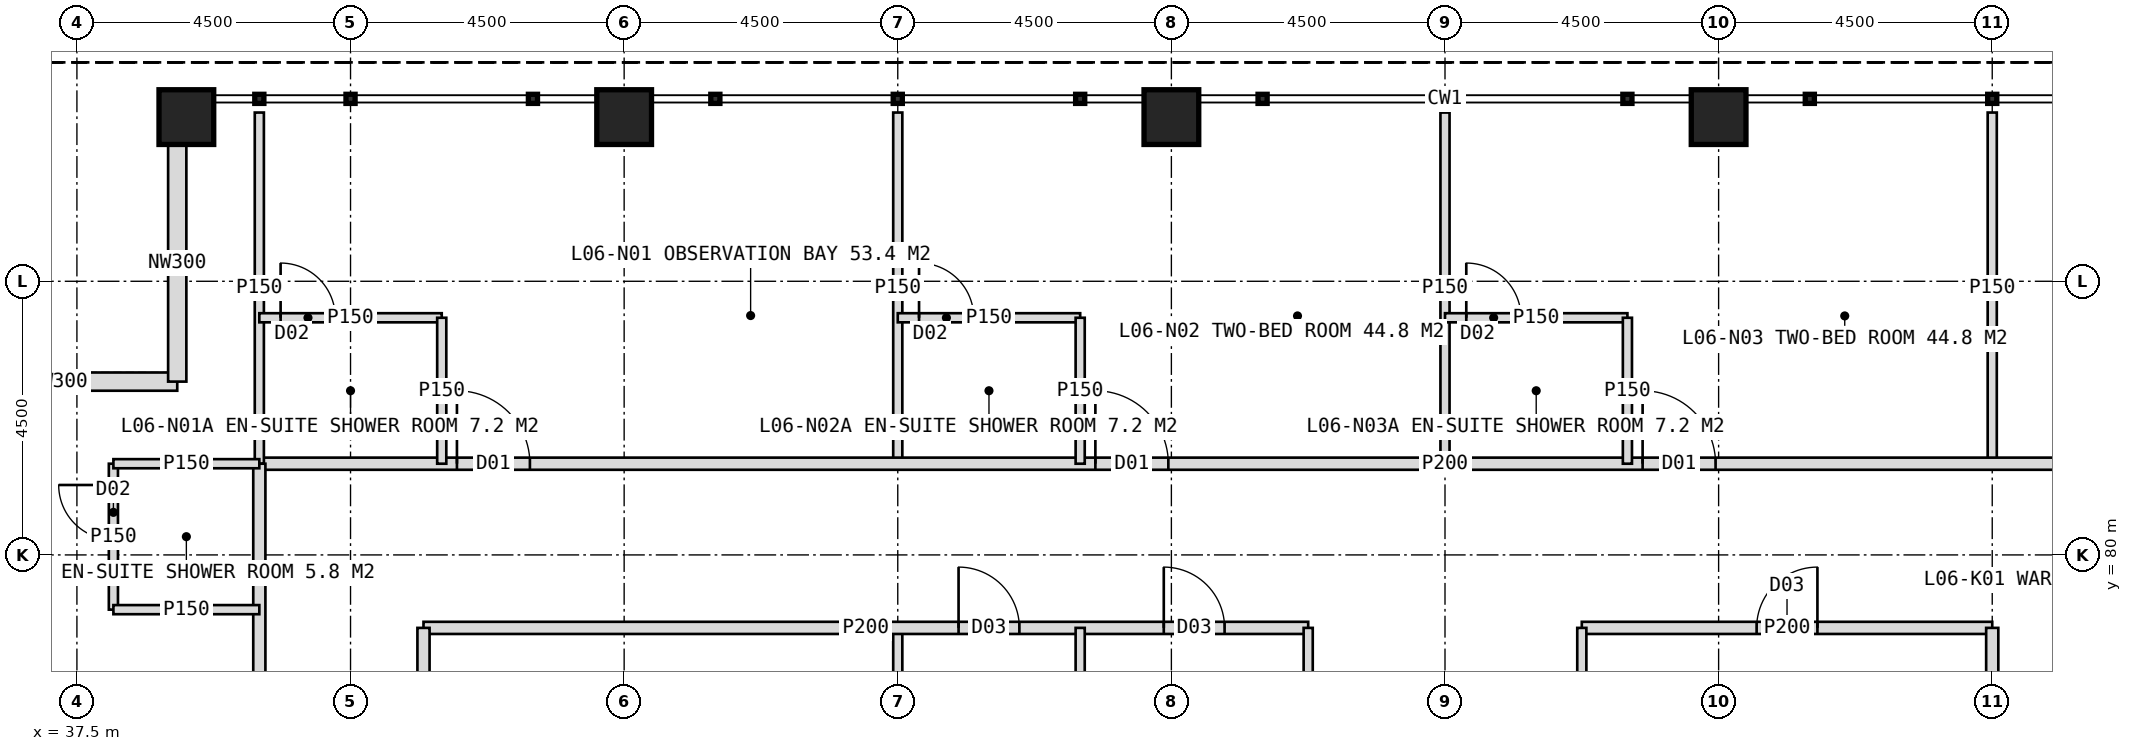
"""IFC4 building model, lengths in metres.
Left out: names, types, materials, properties, quantities, classifications, styles, units other than length and angle.
Written with IfcOpenShell. Run it as: python <this file> out.ifc"""

import sys

from ifc_helpers import new_model, si_unit, direction, frame, frame_2d, origin, origin_2d, place, context, subcontext, project, spatial, rectangle, hollow_rectangle, extrude, element, fill, save


model = new_model("IFC4")
c1 = context("Model", 3, precision=1e-05, world=origin(), true_north=direction((0.0, 1.0)))
c2 = subcontext(c1, "Body", "Model", "MODEL_VIEW")
j1 = project(units=[si_unit("LENGTHUNIT", "METRE"), si_unit("PLANEANGLEUNIT", "RADIAN")], contexts=[c1])
p1 = place(None, origin())
s1 = spatial("IfcSite", under=j1, at=p1, CompositionType="ELEMENT")
p2 = place(p1, origin())
s2 = spatial("IfcBuilding", under=s1, at=p2, CompositionType="ELEMENT")
p3 = place(p2, frame((0.0, 0.0, 31.0)))
s3 = spatial("IfcBuildingStorey", under=s2, at=p3, CompositionType="ELEMENT", Elevation=31.0)
for number, where, z_axis, x_axis in (
    (1, (39.3, 87.2, 0.0), (0.0, 0.0, 1.0), (1.0, 0.0, 0.0)),
    (2, (46.5, 87.2, 0.0), (0.0, 0.0, 1.0), (1.0, 0.0, 0.0)),
    (3, (55.5, 87.2, 0.0), (0.0, 0.0, 1.0), (1.0, 0.0, 0.0)),
    (4, (64.5, 87.2, 0.0), (0.0, 0.0, 1.0), (1.0, 0.0, 0.0)),
):
    element("IfcColumn", number, at=place(p3, frame(where, z_axis=z_axis, x_axis=x_axis)), inside=s3, PredefinedType="COLUMN", context=c2, shape_type="SweptSolid", body=[
        extrude(hollow_rectangle(XDim=0.9, YDim=0.9, WallThickness=0.08, at=origin_2d()), origin(), (0.0, 0.0, 1.0), 4.0),
    ])
for number, where, z_axis, x_axis in (
    (5, (35.25, 82.85, 0.0), (0.0, 0.0, 1.0), (1.0, 0.0, 0.0)),
    (6, (39.15, 82.85, 0.0), (0.0, 0.0, 1.0), (0.0, 1.0, 0.0)),
):
    element("IfcWall", number, at=place(p3, frame(where, z_axis=z_axis, x_axis=x_axis)), inside=s3, PredefinedType="ELEMENTEDWALL", context=c2, shape_type="SweptSolid", body=[
        extrude(rectangle(XDim=3.9, YDim=0.3, at=frame_2d((1.95, 0.0))), origin(), (0.0, 0.0, 1.0), 2.95),
    ])
p4 = place(p3, frame((51.0, 81.5, 0.0), z_axis=(0.0, 0.0, 1.0), x_axis=(0.0, 1.0, 0.0)))
e7 = element("IfcWall", 7, at=p4, inside=s3, PredefinedType="PARTITIONING", context=c2, shape_type="SweptSolid", body=[
    extrude(rectangle(XDim=5.775, YDim=0.15, at=frame_2d((2.887, 0.0))), origin(), (0.0, 0.0, 1.0), 3.75),
])
p5 = place(p3, frame((60.0, 81.5, 0.0), z_axis=(0.0, 0.0, 1.0), x_axis=(0.0, 1.0, 0.0)))
e8 = element("IfcWall", 8, at=p5, inside=s3, PredefinedType="PARTITIONING", context=c2, shape_type="SweptSolid", body=[
    extrude(rectangle(XDim=5.775, YDim=0.15, at=frame_2d((2.887, 0.0))), origin(), (0.0, 0.0, 1.0), 2.75),
])
p6 = place(p3, frame((69.0, 81.5, 0.0), z_axis=(0.0, 0.0, 1.0), x_axis=(0.0, 1.0, 0.0)))
e9 = element("IfcWall", 9, at=p6, inside=s3, PredefinedType="PARTITIONING", context=c2, shape_type="SweptSolid", body=[
    extrude(rectangle(XDim=5.775, YDim=0.15, at=frame_2d((2.887, 0.0))), origin(), (0.0, 0.0, 1.0), 3.75),
])
p7 = place(p3, frame((40.5, 81.5, 0.0), z_axis=(0.0, 0.0, 1.0), x_axis=(1.0, 0.0, 0.0)))
e10 = element("IfcWall", 10, at=p7, inside=s3, PredefinedType="PARTITIONING", context=c2, shape_type="SweptSolid", body=[
    extrude(rectangle(XDim=39.0, YDim=0.2, at=frame_2d((19.5, 0.0))), origin(), (0.0, 0.0, 1.0), 3.75),
])
p8 = place(p7, frame((3.25, 0.0, 0.0)))
e11 = element("IfcOpeningElement", 11, at=p8, cuts=e10, PredefinedType="OPENING", context=c2, shape_type="SweptSolid", body=[
    extrude(rectangle(XDim=1.2, YDim=2.2, at=frame_2d((0.6, 1.1))), frame((0.0, 0.11, 0.0), z_axis=(0.0, -1.0, 0.0), x_axis=(1.0, 0.0, 0.0)), (0.0, 0.0, 1.0), 0.22),
])
p9 = place(p7, frame((13.75, 0.0, 0.0)))
e12 = element("IfcOpeningElement", 12, at=p9, cuts=e10, PredefinedType="OPENING", context=c2, shape_type="SweptSolid", body=[
    extrude(rectangle(XDim=1.2, YDim=2.2, at=frame_2d((0.6, 1.1))), frame((0.0, 0.11, 0.0), z_axis=(0.0, -1.0, 0.0), x_axis=(1.0, 0.0, 0.0)), (0.0, 0.0, 1.0), 0.22),
])
p10 = place(p7, frame((22.75, 0.0, 0.0)))
e13 = element("IfcOpeningElement", 13, at=p10, cuts=e10, PredefinedType="OPENING", context=c2, shape_type="SweptSolid", body=[
    extrude(rectangle(XDim=1.2, YDim=2.2, at=frame_2d((0.6, 1.1))), frame((0.0, 0.11, 0.0), z_axis=(0.0, -1.0, 0.0), x_axis=(1.0, 0.0, 0.0)), (0.0, 0.0, 1.0), 0.22),
])
p11 = place(p7, frame((33.25, 0.0, 0.0)))
e14 = element("IfcOpeningElement", 14, at=p11, cuts=e10, PredefinedType="OPENING", context=c2, shape_type="SweptSolid", body=[
    extrude(rectangle(XDim=1.0, YDim=2.1, at=frame_2d((0.5, 1.05))), frame((0.0, 0.11, 0.0), z_axis=(0.0, -1.0, 0.0), x_axis=(1.0, 0.0, 0.0)), (0.0, 0.0, 1.0), 0.22),
])
p12 = place(p3, frame((40.5, 81.5, 0.0), z_axis=(0.0, 0.0, 1.0), x_axis=(0.0, 1.0, 0.0)))
e15 = element("IfcWall", 15, at=p12, inside=s3, PredefinedType="PARTITIONING", context=c2, shape_type="SweptSolid", body=[
    extrude(rectangle(XDim=5.775, YDim=0.15, at=frame_2d((2.887, 0.0))), origin(), (0.0, 0.0, 1.0), 3.75),
])
p13 = place(p3, frame((40.5, 83.9, 0.0), z_axis=(0.0, 0.0, 1.0), x_axis=(1.0, 0.0, 0.0)))
e16 = element("IfcWall", 16, at=p13, inside=s3, PredefinedType="PARTITIONING", context=c2, shape_type="SweptSolid", body=[
    extrude(rectangle(XDim=3.0, YDim=0.15, at=frame_2d((1.5, 0.0))), origin(), (0.0, 0.0, 1.0), 3.75),
])
p14 = place(p13, frame((0.35, 0.0, 0.0)))
e17 = element("IfcOpeningElement", 17, at=p14, cuts=e16, PredefinedType="OPENING", context=c2, shape_type="SweptSolid", body=[
    extrude(rectangle(XDim=0.9, YDim=2.1, at=frame_2d((0.45, 1.05))), frame((0.0, 0.085, 0.0), z_axis=(0.0, -1.0, 0.0), x_axis=(1.0, 0.0, 0.0)), (0.0, 0.0, 1.0), 0.17),
])
p15 = place(p3, frame((43.5, 81.5, 0.0), z_axis=(0.0, 0.0, 1.0), x_axis=(0.0, 1.0, 0.0)))
e18 = element("IfcWall", 18, at=p15, inside=s3, PredefinedType="PARTITIONING", context=c2, shape_type="SweptSolid", body=[
    extrude(rectangle(XDim=2.4, YDim=0.15, at=frame_2d((1.2, 0.0))), origin(), (0.0, 0.0, 1.0), 3.75),
])
p16 = place(p3, frame((51.0, 83.9, 0.0), z_axis=(0.0, 0.0, 1.0), x_axis=(1.0, 0.0, 0.0)))
e19 = element("IfcWall", 19, at=p16, inside=s3, PredefinedType="PARTITIONING", context=c2, shape_type="SweptSolid", body=[
    extrude(rectangle(XDim=3.0, YDim=0.15, at=frame_2d((1.5, 0.0))), origin(), (0.0, 0.0, 1.0), 3.75),
])
p17 = place(p16, frame((0.35, 0.0, 0.0)))
e20 = element("IfcOpeningElement", 20, at=p17, cuts=e19, PredefinedType="OPENING", context=c2, shape_type="SweptSolid", body=[
    extrude(rectangle(XDim=0.9, YDim=2.1, at=frame_2d((0.45, 1.05))), frame((0.0, 0.085, 0.0), z_axis=(0.0, -1.0, 0.0), x_axis=(1.0, 0.0, 0.0)), (0.0, 0.0, 1.0), 0.17),
])
p18 = place(p3, frame((54.0, 81.5, 0.0), z_axis=(0.0, 0.0, 1.0), x_axis=(0.0, 1.0, 0.0)))
e21 = element("IfcWall", 21, at=p18, inside=s3, PredefinedType="PARTITIONING", context=c2, shape_type="SweptSolid", body=[
    extrude(rectangle(XDim=2.4, YDim=0.15, at=frame_2d((1.2, 0.0))), origin(), (0.0, 0.0, 1.0), 3.75),
])
p19 = place(p3, frame((60.0, 83.9, 0.0), z_axis=(0.0, 0.0, 1.0), x_axis=(1.0, 0.0, 0.0)))
e22 = element("IfcWall", 22, at=p19, inside=s3, PredefinedType="PARTITIONING", context=c2, shape_type="SweptSolid", body=[
    extrude(rectangle(XDim=3.0, YDim=0.15, at=frame_2d((1.5, 0.0))), origin(), (0.0, 0.0, 1.0), 3.75),
])
p20 = place(p19, frame((0.35, 0.0, 0.0)))
e23 = element("IfcOpeningElement", 23, at=p20, cuts=e22, PredefinedType="OPENING", context=c2, shape_type="SweptSolid", body=[
    extrude(rectangle(XDim=0.9, YDim=2.1, at=frame_2d((0.45, 1.05))), frame((0.0, 0.085, 0.0), z_axis=(0.0, -1.0, 0.0), x_axis=(1.0, 0.0, 0.0)), (0.0, 0.0, 1.0), 0.17),
])
p21 = place(p3, frame((63.0, 81.5, 0.0), z_axis=(0.0, 0.0, 1.0), x_axis=(0.0, 1.0, 0.0)))
e24 = element("IfcWall", 24, at=p21, inside=s3, PredefinedType="PARTITIONING", context=c2, shape_type="SweptSolid", body=[
    extrude(rectangle(XDim=2.4, YDim=0.15, at=frame_2d((1.2, 0.0))), origin(), (0.0, 0.0, 1.0), 3.75),
])
p22 = place(p3, frame((51.0, 71.0, 0.0), z_axis=(0.0, 0.0, 1.0), x_axis=(0.0, 1.0, 0.0)))
e25 = element("IfcWall", 25, at=p22, inside=s3, PredefinedType="PARTITIONING", context=c2, shape_type="SweptSolid", body=[
    extrude(rectangle(XDim=7.8, YDim=0.15, at=frame_2d((3.9, 0.0))), origin(), (0.0, 0.0, 1.0), 3.75),
])
p23 = place(p3, frame((43.2, 78.8, 0.0), z_axis=(0.0, 0.0, 1.0), x_axis=(1.0, 0.0, 0.0)))
e26 = element("IfcWall", 26, at=p23, inside=s3, PredefinedType="PARTITIONING", context=c2, shape_type="SweptSolid", body=[
    extrude(rectangle(XDim=14.55, YDim=0.2, at=frame_2d((7.275, 0.0))), origin(), (0.0, 0.0, 1.0), 3.75),
])
p24 = place(p23, frame((8.8, 0.0, 0.0)))
e27 = element("IfcOpeningElement", 27, at=p24, cuts=e26, PredefinedType="OPENING", context=c2, shape_type="SweptSolid", body=[
    extrude(rectangle(XDim=1.0, YDim=2.1, at=frame_2d((0.5, 1.05))), frame((0.0, 0.11, 0.0), z_axis=(0.0, -1.0, 0.0), x_axis=(1.0, 0.0, 0.0)), (0.0, 0.0, 1.0), 0.22),
])
p25 = place(p23, frame((12.175, 0.0, 0.0)))
e28 = element("IfcOpeningElement", 28, at=p25, cuts=e26, PredefinedType="OPENING", context=c2, shape_type="SweptSolid", body=[
    extrude(rectangle(XDim=1.0, YDim=2.1, at=frame_2d((0.5, 1.05))), frame((0.0, 0.11, 0.0), z_axis=(0.0, -1.0, 0.0), x_axis=(1.0, 0.0, 0.0)), (0.0, 0.0, 1.0), 0.22),
])
p26 = place(p3, frame((62.25, 78.8, 0.0), z_axis=(0.0, 0.0, 1.0), x_axis=(1.0, 0.0, 0.0)))
e29 = element("IfcWall", 29, at=p26, inside=s3, PredefinedType="PARTITIONING", context=c2, shape_type="SweptSolid", body=[
    extrude(rectangle(XDim=6.75, YDim=0.2, at=frame_2d((3.375, 0.0))), origin(), (0.0, 0.0, 1.0), 3.75),
])
p27 = place(p26, frame((2.875, 0.0, 0.0)))
e30 = element("IfcOpeningElement", 30, at=p27, cuts=e29, PredefinedType="OPENING", context=c2, shape_type="SweptSolid", body=[
    extrude(rectangle(XDim=1.0, YDim=2.1, at=frame_2d((0.5, 1.05))), frame((0.0, 0.11, 0.0), z_axis=(0.0, -1.0, 0.0), x_axis=(1.0, 0.0, 0.0)), (0.0, 0.0, 1.0), 0.22),
])
p28 = place(p3, frame((57.75, 71.0, 0.0), z_axis=(0.0, 0.0, 1.0), x_axis=(0.0, 1.0, 0.0)))
e31 = element("IfcWall", 31, at=p28, inside=s3, PredefinedType="PARTITIONING", context=c2, shape_type="SweptSolid", body=[
    extrude(rectangle(XDim=7.8, YDim=0.15, at=frame_2d((3.9, 0.0))), origin(), (0.0, 0.0, 1.0), 3.75),
])
p29 = place(p28, frame((0.6, 0.0, 0.0)))
e32 = element("IfcOpeningElement", 32, at=p29, cuts=e31, PredefinedType="OPENING", context=c2, shape_type="SweptSolid", body=[
    extrude(rectangle(XDim=0.9, YDim=2.1, at=frame_2d((0.45, 1.05))), frame((0.0, 0.085, 0.0), z_axis=(0.0, -1.0, 0.0), x_axis=(1.0, 0.0, 0.0)), (0.0, 0.0, 1.0), 0.17),
])
p30 = place(p3, frame((62.25, 71.0, 0.0), z_axis=(0.0, 0.0, 1.0), x_axis=(0.0, 1.0, 0.0)))
e33 = element("IfcWall", 33, at=p30, inside=s3, PredefinedType="PARTITIONING", context=c2, shape_type="SweptSolid", body=[
    extrude(rectangle(XDim=7.8, YDim=0.15, at=frame_2d((3.9, 0.0))), origin(), (0.0, 0.0, 1.0), 3.75),
])
p31 = place(p30, frame((0.6, 0.0, 0.0)))
e34 = element("IfcOpeningElement", 34, at=p31, cuts=e33, PredefinedType="OPENING", context=c2, shape_type="SweptSolid", body=[
    extrude(rectangle(XDim=0.9, YDim=2.1, at=frame_2d((0.45, 1.05))), frame((0.0, 0.085, 0.0), z_axis=(0.0, -1.0, 0.0), x_axis=(1.0, 0.0, 0.0)), (0.0, 0.0, 1.0), 0.17),
])
p32 = place(p3, frame((54.0, 71.0, 0.0), z_axis=(0.0, 0.0, 1.0), x_axis=(0.0, 1.0, 0.0)))
e35 = element("IfcWall", 35, at=p32, inside=s3, PredefinedType="PARTITIONING", context=c2, shape_type="SweptSolid", body=[
    extrude(rectangle(XDim=7.8, YDim=0.15, at=frame_2d((3.9, 0.0))), origin(), (0.0, 0.0, 1.0), 3.75),
])
p33 = place(p3, frame((40.5, 42.5, 0.0), z_axis=(0.0, 0.0, 1.0), x_axis=(0.0, 1.0, 0.0)))
e36 = element("IfcWall", 36, at=p33, inside=s3, PredefinedType="PARTITIONING", context=c2, shape_type="SweptSolid", body=[
    extrude(rectangle(XDim=39.0, YDim=0.2, at=frame_2d((19.5, 0.0))), origin(), (0.0, 0.0, 1.0), 3.75),
])
p34 = place(p33, frame((3.25, 0.0, 0.0)))
e37 = element("IfcOpeningElement", 37, at=p34, cuts=e36, PredefinedType="OPENING", context=c2, shape_type="SweptSolid", body=[
    extrude(rectangle(XDim=1.2, YDim=2.2, at=frame_2d((0.6, 1.1))), frame((0.0, 0.11, 0.0), z_axis=(0.0, -1.0, 0.0), x_axis=(1.0, 0.0, 0.0)), (0.0, 0.0, 1.0), 0.22),
])
p35 = place(p33, frame((10.15, 0.0, 0.0)))
e38 = element("IfcOpeningElement", 38, at=p35, cuts=e36, PredefinedType="OPENING", context=c2, shape_type="SweptSolid", body=[
    extrude(rectangle(XDim=1.2, YDim=2.2, at=frame_2d((0.6, 1.1))), frame((0.0, 0.11, 0.0), z_axis=(0.0, -1.0, 0.0), x_axis=(1.0, 0.0, 0.0)), (0.0, 0.0, 1.0), 0.22),
])
p36 = place(p33, frame((16.15, 0.0, 0.0)))
e39 = element("IfcOpeningElement", 39, at=p36, cuts=e36, PredefinedType="OPENING", context=c2, shape_type="SweptSolid", body=[
    extrude(rectangle(XDim=1.2, YDim=2.2, at=frame_2d((0.6, 1.1))), frame((0.0, 0.11, 0.0), z_axis=(0.0, -1.0, 0.0), x_axis=(1.0, 0.0, 0.0)), (0.0, 0.0, 1.0), 0.22),
])
p37 = place(p33, frame((22.75, 0.0, 0.0)))
e40 = element("IfcOpeningElement", 40, at=p37, cuts=e36, PredefinedType="OPENING", context=c2, shape_type="SweptSolid", body=[
    extrude(rectangle(XDim=1.2, YDim=2.2, at=frame_2d((0.6, 1.1))), frame((0.0, 0.11, 0.0), z_axis=(0.0, -1.0, 0.0), x_axis=(1.0, 0.0, 0.0)), (0.0, 0.0, 1.0), 0.22),
])
p38 = place(p33, frame((31.15, 0.0, 0.0)))
e41 = element("IfcOpeningElement", 41, at=p38, cuts=e36, PredefinedType="OPENING", context=c2, shape_type="SweptSolid", body=[
    extrude(rectangle(XDim=1.2, YDim=2.2, at=frame_2d((0.6, 1.1))), frame((0.0, 0.11, 0.0), z_axis=(0.0, -1.0, 0.0), x_axis=(1.0, 0.0, 0.0)), (0.0, 0.0, 1.0), 0.22),
])
p39 = place(p3, frame((38.1, 79.1, 0.0), z_axis=(0.0, 0.0, 1.0), x_axis=(0.0, 1.0, 0.0)))
e42 = element("IfcWall", 42, at=p39, inside=s3, PredefinedType="PARTITIONING", context=c2, shape_type="SweptSolid", body=[
    extrude(rectangle(XDim=2.4, YDim=0.15, at=frame_2d((1.2, 0.0))), origin(), (0.0, 0.0, 1.0), 3.75),
])
p40 = place(p39, frame((1.15, 0.0, 0.0)))
e43 = element("IfcOpeningElement", 43, at=p40, cuts=e42, PredefinedType="OPENING", context=c2, shape_type="SweptSolid", body=[
    extrude(rectangle(XDim=0.9, YDim=2.1, at=frame_2d((0.45, 1.05))), frame((0.0, 0.085, 0.0), z_axis=(0.0, -1.0, 0.0), x_axis=(1.0, 0.0, 0.0)), (0.0, 0.0, 1.0), 0.17),
])
for number, where, z_axis, x_axis in (
    (44, (40.5, 79.1, 0.0), (0.0, 0.0, 1.0), (-1.0, 0.0, 0.0)),
    (45, (40.5, 81.5, 0.0), (0.0, 0.0, 1.0), (-1.0, 0.0, 0.0)),
):
    element("IfcWall", number, at=place(p3, frame(where, z_axis=z_axis, x_axis=x_axis)), inside=s3, PredefinedType="PARTITIONING", context=c2, shape_type="SweptSolid", body=[
        extrude(rectangle(XDim=2.4, YDim=0.15, at=frame_2d((1.2, 0.0))), origin(), (0.0, 0.0, 1.0), 3.75),
    ])
p41 = place(p3, frame((43.2, 62.0, 0.0), z_axis=(0.0, 0.0, 1.0), x_axis=(0.0, 1.0, 0.0)))
e46 = element("IfcWall", 46, at=p41, inside=s3, PredefinedType="PARTITIONING", context=c2, shape_type="SweptSolid", body=[
    extrude(rectangle(XDim=16.8, YDim=0.2, at=frame_2d((8.4, 0.0))), origin(), (0.0, 0.0, 1.0), 3.75),
])
p42 = place(p41, frame((4.0, 0.0, 0.0)))
e47 = element("IfcOpeningElement", 47, at=p42, cuts=e46, PredefinedType="OPENING", context=c2, shape_type="SweptSolid", body=[
    extrude(rectangle(XDim=1.0, YDim=2.1, at=frame_2d((0.5, 1.05))), frame((0.0, 0.11, 0.0), z_axis=(0.0, -1.0, 0.0), x_axis=(1.0, 0.0, 0.0)), (0.0, 0.0, 1.0), 0.22),
])
p43 = place(p41, frame((12.4, 0.0, 0.0)))
e48 = element("IfcOpeningElement", 48, at=p43, cuts=e46, PredefinedType="OPENING", context=c2, shape_type="SweptSolid", body=[
    extrude(rectangle(XDim=1.0, YDim=2.1, at=frame_2d((0.5, 1.05))), frame((0.0, 0.11, 0.0), z_axis=(0.0, -1.0, 0.0), x_axis=(1.0, 0.0, 0.0)), (0.0, 0.0, 1.0), 0.22),
])
p44 = place(p3, frame((69.0, 75.1, 0.0), z_axis=(0.0, 0.0, 1.0), x_axis=(0.0, 1.0, 0.0)))
e49 = element("IfcWall", 49, at=p44, inside=s3, PredefinedType="PARTITIONING", context=c2, shape_type="SweptSolid", body=[
    extrude(rectangle(XDim=3.7, YDim=0.2, at=frame_2d((1.85, 0.0))), origin(), (0.0, 0.0, 1.0), 3.75),
])
p45 = place(p8, origin())
e50 = element("IfcDoor", 50, at=p45, inside=s3, OperationType="SINGLE_SWING_LEFT", PredefinedType="DOOR", context=c2, shape_type="SweptSolid", body=[
    extrude(rectangle(XDim=1.2, YDim=2.2, at=frame_2d((0.6, 1.1))), frame((0.0, 0.025, 0.0), z_axis=(0.0, -1.0, 0.0), x_axis=(1.0, 0.0, 0.0)), (0.0, 0.0, 1.0), 0.05),
])
fill(e11, e50)
p46 = place(p14, origin())
e51 = element("IfcDoor", 51, at=p46, inside=s3, OperationType="SINGLE_SWING_LEFT", PredefinedType="DOOR", context=c2, shape_type="SweptSolid", body=[
    extrude(rectangle(XDim=0.9, YDim=2.1, at=frame_2d((0.45, 1.05))), frame((0.0, 0.025, 0.0), z_axis=(0.0, -1.0, 0.0), x_axis=(1.0, 0.0, 0.0)), (0.0, 0.0, 1.0), 0.05),
])
fill(e17, e51)
p47 = place(p9, origin())
e52 = element("IfcDoor", 52, at=p47, inside=s3, OperationType="SINGLE_SWING_LEFT", PredefinedType="DOOR", context=c2, shape_type="SweptSolid", body=[
    extrude(rectangle(XDim=1.2, YDim=2.2, at=frame_2d((0.6, 1.1))), frame((0.0, 0.025, 0.0), z_axis=(0.0, -1.0, 0.0), x_axis=(1.0, 0.0, 0.0)), (0.0, 0.0, 1.0), 0.05),
])
fill(e12, e52)
p48 = place(p17, origin())
e53 = element("IfcDoor", 53, at=p48, inside=s3, OperationType="SINGLE_SWING_LEFT", PredefinedType="DOOR", context=c2, shape_type="SweptSolid", body=[
    extrude(rectangle(XDim=0.9, YDim=2.1, at=frame_2d((0.45, 1.05))), frame((0.0, 0.025, 0.0), z_axis=(0.0, -1.0, 0.0), x_axis=(1.0, 0.0, 0.0)), (0.0, 0.0, 1.0), 0.05),
])
fill(e20, e53)
p49 = place(p10, origin())
e54 = element("IfcDoor", 54, at=p49, inside=s3, OperationType="SINGLE_SWING_LEFT", PredefinedType="DOOR", context=c2, shape_type="SweptSolid", body=[
    extrude(rectangle(XDim=1.2, YDim=2.2, at=frame_2d((0.6, 1.1))), frame((0.0, 0.025, 0.0), z_axis=(0.0, -1.0, 0.0), x_axis=(1.0, 0.0, 0.0)), (0.0, 0.0, 1.0), 0.05),
])
fill(e13, e54)
p50 = place(p20, origin())
e55 = element("IfcDoor", 55, at=p50, inside=s3, OperationType="SINGLE_SWING_LEFT", PredefinedType="DOOR", context=c2, shape_type="SweptSolid", body=[
    extrude(rectangle(XDim=0.9, YDim=2.1, at=frame_2d((0.45, 1.05))), frame((0.0, 0.025, 0.0), z_axis=(0.0, -1.0, 0.0), x_axis=(1.0, 0.0, 0.0)), (0.0, 0.0, 1.0), 0.05),
])
fill(e23, e55)
p51 = place(p24, origin())
e56 = element("IfcDoor", 56, at=p51, inside=s3, OperationType="SINGLE_SWING_LEFT", PredefinedType="DOOR", context=c2, shape_type="SweptSolid", body=[
    extrude(rectangle(XDim=1.0, YDim=2.1, at=frame_2d((0.5, 1.05))), frame((0.0, 0.025, 0.0), z_axis=(0.0, -1.0, 0.0), x_axis=(1.0, 0.0, 0.0)), (0.0, 0.0, 1.0), 0.05),
])
fill(e27, e56)
p52 = place(p25, origin())
e57 = element("IfcDoor", 57, at=p52, inside=s3, OperationType="SINGLE_SWING_LEFT", PredefinedType="DOOR", context=c2, shape_type="SweptSolid", body=[
    extrude(rectangle(XDim=1.0, YDim=2.1, at=frame_2d((0.5, 1.05))), frame((0.0, 0.025, 0.0), z_axis=(0.0, -1.0, 0.0), x_axis=(1.0, 0.0, 0.0)), (0.0, 0.0, 1.0), 0.05),
])
fill(e28, e57)
p53 = place(p27, origin())
e58 = element("IfcDoor", 58, at=p53, inside=s3, OperationType="SINGLE_SWING_RIGHT", PredefinedType="DOOR", context=c2, shape_type="SweptSolid", body=[
    extrude(rectangle(XDim=1.0, YDim=2.1, at=frame_2d((0.5, 1.05))), frame((0.0, 0.025, 0.0), z_axis=(0.0, -1.0, 0.0), x_axis=(1.0, 0.0, 0.0)), (0.0, 0.0, 1.0), 0.05),
])
fill(e30, e58)
p54 = place(p40, origin())
e59 = element("IfcDoor", 59, at=p54, inside=s3, OperationType="SINGLE_SWING_RIGHT", PredefinedType="DOOR", context=c2, shape_type="SweptSolid", body=[
    extrude(rectangle(XDim=0.9, YDim=2.1, at=frame_2d((0.45, 1.05))), frame((0.0, 0.025, 0.0), z_axis=(0.0, -1.0, 0.0), x_axis=(1.0, 0.0, 0.0)), (0.0, 0.0, 1.0), 0.05),
])
fill(e43, e59)
save(model, sys.argv[1])
